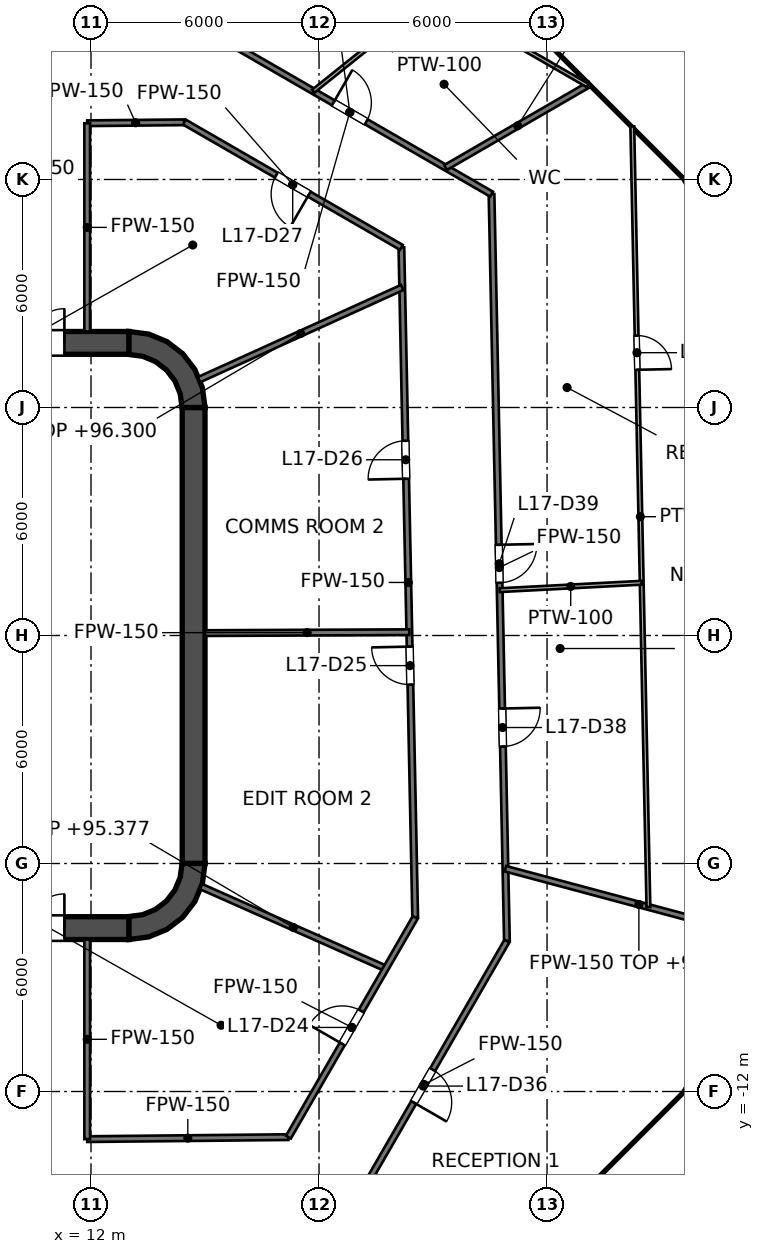
"""IFC4 building model, lengths in metres.
Left out: names, types, materials, properties, quantities, classifications, styles, units other than length and angle.
Written with IfcOpenShell. Run it as: python <this file> out.ifc"""

import sys

from ifc_helpers import new_model, si_unit, direction, frame, frame_2d, origin, place, context, subcontext, project, spatial, polyline, rectangle, outline, extrude, element, fill, save


model = new_model("IFC4")
c1 = context("Model", 3, precision=1e-05, world=origin(), true_north=direction((0.0, 1.0)))
c2 = subcontext(c1, "Body", "Model", "MODEL_VIEW")
j1 = project(units=[si_unit("LENGTHUNIT", "METRE"), si_unit("PLANEANGLEUNIT", "RADIAN")], contexts=[c1])
p1 = place(None, origin())
s1 = spatial("IfcSite", under=j1, at=p1, CompositionType="ELEMENT")
p2 = place(p1, origin())
s2 = spatial("IfcBuilding", under=s1, at=p2, CompositionType="ELEMENT")
p3 = place(p2, frame((0.0, 0.0, 92.4)))
s3 = spatial("IfcBuildingStorey", under=s2, at=p3, CompositionType="ELEMENT", Elevation=92.4)
p4 = place(p3, frame((-13.0, 7.7, 0.0), z_axis=(0.0, 0.0, 1.0), x_axis=(1.0, 0.0, 0.0)))
e1 = element("IfcWall", 1, at=p4, inside=s3, PredefinedType="SHEAR", context=c2, shape_type="SweptSolid", body=[
    extrude(rectangle(XDim=26.0, YDim=0.6, at=frame_2d((13.0, 0.0))), origin(), (0.0, 0.0, 1.0), 4.2),
])
p5 = place(p4, frame((1.7, 0.0, 0.0)))
e2 = element("IfcOpeningElement", 2, at=p5, cuts=e1, PredefinedType="OPENING", context=c2, shape_type="SweptSolid", body=[
    extrude(rectangle(XDim=1.8, YDim=2.1, at=frame_2d((0.9, 1.05))), frame((0.0, 0.3, 0.0), z_axis=(0.0, -1.0, 0.0), x_axis=(1.0, 0.0, 0.0)), (0.0, 0.0, 1.0), 0.6),
])
p6 = place(p4, frame((22.5, 0.0, 0.0)))
e3 = element("IfcOpeningElement", 3, at=p6, cuts=e1, PredefinedType="OPENING", context=c2, shape_type="SweptSolid", body=[
    extrude(rectangle(XDim=1.8, YDim=2.1, at=frame_2d((0.9, 1.05))), frame((0.0, 0.3, 0.0), z_axis=(0.0, -1.0, 0.0), x_axis=(1.0, 0.0, 0.0)), (0.0, 0.0, 1.0), 0.6),
])
p7 = place(p3, frame((-13.0, -7.7, 0.0), z_axis=(0.0, 0.0, 1.0), x_axis=(1.0, 0.0, 0.0)))
e4 = element("IfcWall", 4, at=p7, inside=s3, PredefinedType="SHEAR", context=c2, shape_type="SweptSolid", body=[
    extrude(rectangle(XDim=26.0, YDim=0.6, at=frame_2d((13.0, 0.0))), origin(), (0.0, 0.0, 1.0), 4.2),
])
p8 = place(p7, frame((1.7, 0.0, 0.0)))
e5 = element("IfcOpeningElement", 5, at=p8, cuts=e4, PredefinedType="OPENING", context=c2, shape_type="SweptSolid", body=[
    extrude(rectangle(XDim=1.8, YDim=2.1, at=frame_2d((0.9, 1.05))), frame((0.0, 0.3, 0.0), z_axis=(0.0, -1.0, 0.0), x_axis=(1.0, 0.0, 0.0)), (0.0, 0.0, 1.0), 0.6),
])
p9 = place(p7, frame((22.5, 0.0, 0.0)))
e6 = element("IfcOpeningElement", 6, at=p9, cuts=e4, PredefinedType="OPENING", context=c2, shape_type="SweptSolid", body=[
    extrude(rectangle(XDim=1.8, YDim=2.1, at=frame_2d((0.9, 1.05))), frame((0.0, 0.3, 0.0), z_axis=(0.0, -1.0, 0.0), x_axis=(1.0, 0.0, 0.0)), (0.0, 0.0, 1.0), 0.6),
])
p10 = place(p3, frame((14.7, -6.0, 0.0), z_axis=(0.0, 0.0, 1.0), x_axis=(0.0, 1.0, 0.0)))
e7 = element("IfcWall", 7, at=p10, inside=s3, PredefinedType="SHEAR", context=c2, shape_type="SweptSolid", body=[
    extrude(rectangle(XDim=12.0, YDim=0.6, at=frame_2d((6.0, 0.0))), origin(), (0.0, 0.0, 1.0), 4.2),
])
p11 = place(p3, origin())
e8 = element("IfcWall", 8, at=p11, inside=s3, PredefinedType="SHEAR", context=c2, shape_type="SweptSolid", body=[
    extrude(outline(polyline([(13.0, 8.0), (13.0, 7.395), (13.361, 7.347), (13.698, 7.208), (13.986, 6.986), (14.208, 6.698), (14.347, 6.361), (14.395, 6.0), (15.0, 6.0), (14.932, 6.518), (14.732, 7.0), (14.414, 7.414), (14.0, 7.732), (13.518, 7.932), (13.0, 8.0)])), origin(), (0.0, 0.0, 1.0), 4.2),
])
e9 = element("IfcWall", 9, at=p11, inside=s3, PredefinedType="SHEAR", context=c2, shape_type="SweptSolid", body=[
    extrude(outline(polyline([(15.0, -6.0), (14.395, -6.0), (14.347, -6.361), (14.208, -6.698), (13.986, -6.986), (13.698, -7.208), (13.361, -7.347), (13.0, -7.395), (13.0, -8.0), (13.518, -7.932), (14.0, -7.732), (14.414, -7.414), (14.732, -7.0), (14.932, -6.518), (15.0, -6.0)])), origin(), (0.0, 0.0, 1.0), 4.2),
])
p12 = place(p3, frame((11.8, -7.4, 0.0), z_axis=(0.0, 0.0, 1.0), x_axis=(0.0, 1.0, 0.0)))
e10 = element("IfcWall", 10, at=p12, inside=s3, PredefinedType="SOLIDWALL", context=c2, shape_type="SweptSolid", body=[
    extrude(rectangle(XDim=14.8, YDim=0.4, at=frame_2d((7.4, 0.0))), origin(), (0.0, 0.0, 1.0), 3.9),
])
p13 = place(p12, frame((11.2, 0.0, 0.0)))
e11 = element("IfcOpeningElement", 11, at=p13, cuts=e10, PredefinedType="OPENING", context=c2, shape_type="SweptSolid", body=[
    extrude(rectangle(XDim=1.1, YDim=2.1, at=frame_2d((0.55, 1.05))), frame((0.0, 0.2, 0.0), z_axis=(0.0, -1.0, 0.0), x_axis=(1.0, 0.0, 0.0)), (0.0, 0.0, 1.0), 0.4),
])
p14 = place(p12, frame((8.3, 0.0, 0.0)))
e12 = element("IfcOpeningElement", 12, at=p14, cuts=e10, PredefinedType="OPENING", context=c2, shape_type="SweptSolid", body=[
    extrude(rectangle(XDim=1.1, YDim=2.1, at=frame_2d((0.55, 1.05))), frame((0.0, 0.2, 0.0), z_axis=(0.0, -1.0, 0.0), x_axis=(1.0, 0.0, 0.0)), (0.0, 0.0, 1.0), 0.4),
])
p15 = place(p12, frame((5.4, 0.0, 0.0)))
e13 = element("IfcOpeningElement", 13, at=p15, cuts=e10, PredefinedType="OPENING", context=c2, shape_type="SweptSolid", body=[
    extrude(rectangle(XDim=1.1, YDim=2.1, at=frame_2d((0.55, 1.05))), frame((0.0, 0.2, 0.0), z_axis=(0.0, -1.0, 0.0), x_axis=(1.0, 0.0, 0.0)), (0.0, 0.0, 1.0), 0.4),
])
p16 = place(p12, frame((13.552, 0.0, 0.0)))
e14 = element("IfcOpeningElement", 14, at=p16, cuts=e10, PredefinedType="OPENING", context=c2, shape_type="SweptSolid", body=[
    extrude(rectangle(XDim=0.9, YDim=2.1, at=frame_2d((0.45, 1.05))), frame((0.0, 0.2, 0.0), z_axis=(0.0, -1.0, 0.0), x_axis=(1.0, 0.0, 0.0)), (0.0, 0.0, 1.0), 0.4),
])
p17 = place(p12, frame((0.347, 0.0, 0.0)))
e15 = element("IfcOpeningElement", 15, at=p17, cuts=e10, PredefinedType="OPENING", context=c2, shape_type="SweptSolid", body=[
    extrude(rectangle(XDim=0.9, YDim=2.1, at=frame_2d((0.45, 1.05))), frame((0.0, 0.2, 0.0), z_axis=(0.0, -1.0, 0.0), x_axis=(1.0, 0.0, 0.0)), (0.0, 0.0, 1.0), 0.4),
])
e16 = element("IfcWall", 16, at=p11, inside=s3, PredefinedType="SOLIDWALL", context=c2, shape_type="SweptSolid", body=[
    extrude(outline(polyline([(12.0, -5.675), (12.0, -5.925), (14.15, -5.925), (14.4, -5.925), (14.4, -5.675), (14.4, -3.025), (14.4, -2.775), (14.4, -0.125), (14.4, 0.125), (14.4, 2.775), (14.4, 3.025), (14.4, 5.675), (14.4, 5.925), (14.15, 5.925), (12.0, 5.925), (12.0, 5.675), (14.15, 5.675), (14.15, 3.025), (12.0, 3.025), (12.0, 2.775), (14.15, 2.775), (14.15, 0.125), (12.0, 0.125), (12.0, -0.125), (14.15, -0.125), (14.15, -2.775), (12.0, -2.775), (12.0, -3.025), (14.15, -3.025), (14.15, -5.675), (12.0, -5.675)])), origin(), (0.0, 0.0, 1.0), 3.9),
])
p18 = place(p3, frame((20.167, 10.213, 0.0), z_axis=(0.0, 0.0, 1.0), x_axis=(0.020610894613, -0.999787572949, 0.0)))
e17 = element("IfcWall", 17, at=p18, inside=s3, PredefinedType="PARTITIONING", context=c2, shape_type="SweptSolid", body=[
    extrude(rectangle(XDim=17.637, YDim=0.15, at=frame_2d((8.819, 0.0))), origin(), (0.0, 0.0, 1.0), 2.968),
])
p19 = place(p18, frame((10.508, 0.0, 0.0)))
e18 = element("IfcOpeningElement", 18, at=p19, cuts=e17, PredefinedType="OPENING", context=c2, shape_type="SweptSolid", body=[
    extrude(rectangle(XDim=1.0, YDim=2.1, at=frame_2d((0.5, 1.05))), frame((0.0, 0.075, 0.0), z_axis=(0.0, -1.0, 0.0), x_axis=(1.0, 0.0, 0.0)), (0.0, 0.0, 1.0), 0.15),
])
p20 = place(p18, frame((5.09, 0.0, 0.0)))
e19 = element("IfcOpeningElement", 19, at=p20, cuts=e17, PredefinedType="OPENING", context=c2, shape_type="SweptSolid", body=[
    extrude(rectangle(XDim=1.0, YDim=2.1, at=frame_2d((0.5, 1.05))), frame((0.0, 0.075, 0.0), z_axis=(0.0, -1.0, 0.0), x_axis=(1.0, 0.0, 0.0)), (0.0, 0.0, 1.0), 0.15),
])
p21 = place(p3, frame((22.539, 11.615, 0.0), z_axis=(0.0, 0.0, 1.0), x_axis=(0.020601506683, -0.99978776644, 0.0)))
e20 = element("IfcWall", 20, at=p21, inside=s3, PredefinedType="PARTITIONING", context=c2, shape_type="SweptSolid", body=[
    extrude(rectangle(XDim=19.66, YDim=0.15, at=frame_2d((9.83, 0.0))), origin(), (0.0, 0.0, 1.0), 2.968),
])
p22 = place(p21, frame((13.54, 0.0, 0.0)))
e21 = element("IfcOpeningElement", 21, at=p22, cuts=e20, PredefinedType="OPENING", context=c2, shape_type="SweptSolid", body=[
    extrude(rectangle(XDim=1.0, YDim=2.1, at=frame_2d((0.5, 1.05))), frame((0.0, 0.075, 0.0), z_axis=(0.0, -1.0, 0.0), x_axis=(1.0, 0.0, 0.0)), (0.0, 0.0, 1.0), 0.15),
])
p23 = place(p21, frame((9.23, 0.0, 0.0)))
e22 = element("IfcOpeningElement", 22, at=p23, cuts=e20, PredefinedType="OPENING", context=c2, shape_type="SweptSolid", body=[
    extrude(rectangle(XDim=1.0, YDim=2.1, at=frame_2d((0.5, 1.05))), frame((0.0, 0.075, 0.0), z_axis=(0.0, -1.0, 0.0), x_axis=(1.0, 0.0, 0.0)), (0.0, 0.0, 1.0), 0.15),
])
p24 = place(p3, frame((14.448, 13.515, 0.0), z_axis=(0.0, 0.0, 1.0), x_axis=(0.866032288321, -0.499988075443, 0.0)))
e23 = element("IfcWall", 23, at=p24, inside=s3, PredefinedType="PARTITIONING", context=c2, shape_type="SweptSolid", body=[
    extrude(rectangle(XDim=6.604, YDim=0.15, at=frame_2d((3.302, 0.0))), origin(), (0.0, 0.0, 1.0), 2.968),
])
p25 = place(p24, frame((2.802, 0.0, 0.0)))
e24 = element("IfcOpeningElement", 24, at=p25, cuts=e23, PredefinedType="OPENING", context=c2, shape_type="SweptSolid", body=[
    extrude(rectangle(XDim=1.0, YDim=2.1, at=frame_2d((0.5, 1.05))), frame((0.0, 0.075, 0.0), z_axis=(0.0, -1.0, 0.0), x_axis=(1.0, 0.0, 0.0)), (0.0, 0.0, 1.0), 0.15),
])
p26 = place(p3, frame((15.08, 15.921, 0.0), z_axis=(0.0, 0.0, 1.0), x_axis=(0.866020838546, -0.500007907142, 0.0)))
e25 = element("IfcWall", 25, at=p26, inside=s3, PredefinedType="PARTITIONING", context=c2, shape_type="SweptSolid", body=[
    extrude(rectangle(XDim=8.613, YDim=0.15, at=frame_2d((4.306, 0.0))), origin(), (0.0, 0.0, 1.0), 2.968),
])
p27 = place(p26, frame((3.807, 0.0, 0.0)))
e26 = element("IfcOpeningElement", 26, at=p27, cuts=e25, PredefinedType="OPENING", context=c2, shape_type="SweptSolid", body=[
    extrude(rectangle(XDim=1.0, YDim=2.1, at=frame_2d((0.5, 1.05))), frame((0.0, 0.075, 0.0), z_axis=(0.0, -1.0, 0.0), x_axis=(1.0, 0.0, 0.0)), (0.0, 0.0, 1.0), 0.15),
])
p28 = place(p3, frame((14.895, -6.607, 0.0), z_axis=(0.0, 0.0, 1.0), x_axis=(0.914233271379, -0.405188259337, 0.0)))
e27 = element("IfcWall", 27, at=p28, inside=s3, PredefinedType="PARTITIONING", context=c2, shape_type="SweptSolid", body=[
    extrude(rectangle(XDim=5.317, YDim=0.15, at=frame_2d((2.659, 0.0))), origin(), (0.0, 0.0, 1.0), 2.977),
])
p29 = place(p3, frame((22.905, -6.137, 0.0), z_axis=(0.0, 0.0, 1.0), x_axis=(0.965915974273, -0.258855810529, 0.0)))
e28 = element("IfcWall", 28, at=p29, inside=s3, PredefinedType="PARTITIONING", context=c2, shape_type="SweptSolid", body=[
    extrude(rectangle(XDim=7.271, YDim=0.15, at=frame_2d((3.635, 0.0))), origin(), (0.0, 0.0, 1.0), 3.727),
])
p30 = place(p3, frame((15.0, 0.063, 0.0), z_axis=(0.0, 0.0, 1.0), x_axis=(0.999990294223, 0.004405843865, 0.0)))
e29 = element("IfcWall", 29, at=p30, inside=s3, PredefinedType="PARTITIONING", context=c2, shape_type="SweptSolid", body=[
    extrude(rectangle(XDim=5.375, YDim=0.15, at=frame_2d((2.688, 0.0))), origin(), (0.0, 0.0, 1.0), 2.968),
])
p31 = place(p3, frame((11.9, -13.253, 0.0), z_axis=(0.0, 0.0, 1.0), x_axis=(0.999950853109, 0.009914200296, 0.0)))
e30 = element("IfcWall", 30, at=p31, inside=s3, PredefinedType="PARTITIONING", context=c2, shape_type="SweptSolid", body=[
    extrude(rectangle(XDim=5.294, YDim=0.15, at=frame_2d((2.647, 0.0))), origin(), (0.0, 0.0, 1.0), 2.968),
])
p32 = place(p3, frame((11.9, 13.48, 0.0), z_axis=(0.0, 0.0, 1.0), x_axis=(0.999950357576, 0.009964054536, 0.0)))
e31 = element("IfcWall", 31, at=p32, inside=s3, PredefinedType="PARTITIONING", context=c2, shape_type="SweptSolid", body=[
    extrude(rectangle(XDim=2.548, YDim=0.15, at=frame_2d((1.274, 0.0))), origin(), (0.0, 0.0, 1.0), 2.968),
])
p33 = place(p3, frame((14.843, 6.733, 0.0), z_axis=(0.0, 0.0, 1.0), x_axis=(0.910628361306, 0.413226315214, 0.0)))
e32 = element("IfcWall", 32, at=p33, inside=s3, PredefinedType="PARTITIONING", context=c2, shape_type="SweptSolid", body=[
    extrude(rectangle(XDim=5.87, YDim=0.15, at=frame_2d((2.935, 0.0))), origin(), (0.0, 0.0, 1.0), 3.9),
])
p34 = place(p3, frame((21.329, 12.314, 0.0), z_axis=(0.0, 0.0, 1.0), x_axis=(0.865416132284, 0.501053807472, 0.0)))
e33 = element("IfcWall", 33, at=p34, inside=s3, PredefinedType="PARTITIONING", context=c2, shape_type="SweptSolid", body=[
    extrude(rectangle(XDim=4.39, YDim=0.15, at=frame_2d((2.195, 0.0))), origin(), (0.0, 0.0, 1.0), 3.045),
])
p35 = place(p3, frame((18.587, -15.587, 0.0), z_axis=(0.0, 0.0, 1.0), x_axis=(0.500026433136, 0.866010142069, 0.0)))
e34 = element("IfcWall", 34, at=p35, inside=s3, PredefinedType="PARTITIONING", context=c2, shape_type="SweptSolid", body=[
    extrude(rectangle(XDim=8.713, YDim=0.15, at=frame_2d((4.357, 0.0))), origin(), (0.0, 0.0, 1.0), 2.968),
])
p36 = place(p35, frame((3.807, 0.0, 0.0)))
e35 = element("IfcOpeningElement", 35, at=p36, cuts=e34, PredefinedType="OPENING", context=c2, shape_type="SweptSolid", body=[
    extrude(rectangle(XDim=1.0, YDim=2.1, at=frame_2d((0.5, 1.05))), frame((0.0, 0.075, 0.0), z_axis=(0.0, -1.0, 0.0), x_axis=(1.0, 0.0, 0.0)), (0.0, 0.0, 1.0), 0.15),
])
p37 = place(p3, frame((17.194, -13.201, 0.0), z_axis=(0.0, 0.0, 1.0), x_axis=(0.50001062018, 0.866019272134, 0.0)))
e36 = element("IfcWall", 36, at=p37, inside=s3, PredefinedType="PARTITIONING", context=c2, shape_type="SweptSolid", body=[
    extrude(rectangle(XDim=6.674, YDim=0.15, at=frame_2d((3.337, 0.0))), origin(), (0.0, 0.0, 1.0), 2.968),
])
p38 = place(p37, frame((2.833, 0.0, 0.0)))
e37 = element("IfcOpeningElement", 37, at=p38, cuts=e36, PredefinedType="OPENING", context=c2, shape_type="SweptSolid", body=[
    extrude(rectangle(XDim=1.0, YDim=2.1, at=frame_2d((0.5, 1.05))), frame((0.0, 0.075, 0.0), z_axis=(0.0, -1.0, 0.0), x_axis=(1.0, 0.0, 0.0)), (0.0, 0.0, 1.0), 0.15),
])
p39 = place(p3, frame((11.9, -13.253, 0.0), z_axis=(0.0, 0.0, 1.0), x_axis=(0.0, 1.0, 0.0)))
e38 = element("IfcWall", 38, at=p39, inside=s3, PredefinedType="PARTITIONING", context=c2, shape_type="SweptSolid", body=[
    extrude(rectangle(XDim=5.253, YDim=0.15, at=frame_2d((2.626, 0.0))), origin(), (0.0, 0.0, 1.0), 2.968),
])
p40 = place(p3, frame((11.9, 8.0, 0.0), z_axis=(0.0, 0.0, 1.0), x_axis=(0.0, 1.0, 0.0)))
e39 = element("IfcWall", 39, at=p40, inside=s3, PredefinedType="PARTITIONING", context=c2, shape_type="SweptSolid", body=[
    extrude(rectangle(XDim=5.479, YDim=0.15, at=frame_2d((2.74, 0.0))), origin(), (0.0, 0.0, 1.0), 2.968),
])
p41 = place(p3, frame((26.243, 13.397, 0.0), z_axis=(0.0, 0.0, 1.0), x_axis=(0.020639766813, -0.999786977324, 0.0)))
e40 = element("IfcWall", 40, at=p41, inside=s3, PredefinedType="PARTITIONING", context=c2, shape_type="SweptSolid", body=[
    extrude(rectangle(XDim=20.546, YDim=0.1, at=frame_2d((10.273, 0.0))), origin(), (0.0, 0.0, 1.0), 2.968),
])
p42 = place(p41, frame((5.506, 0.0, 0.0)))
e41 = element("IfcOpeningElement", 41, at=p42, cuts=e40, PredefinedType="OPENING", context=c2, shape_type="SweptSolid", body=[
    extrude(rectangle(XDim=0.9, YDim=2.1, at=frame_2d((0.45, 1.05))), frame((0.0, 0.05, 0.0), z_axis=(0.0, -1.0, 0.0), x_axis=(1.0, 0.0, 0.0)), (0.0, 0.0, 1.0), 0.1),
])
p43 = place(p3, frame((16.065, 19.671, 0.0), z_axis=(0.0, 0.0, 1.0), x_axis=(0.866058502288, -0.499942667328, 0.0)))
e42 = element("IfcWall", 42, at=p43, inside=s3, PredefinedType="PARTITIONING", context=c2, shape_type="SweptSolid", body=[
    extrude(rectangle(XDim=10.397, YDim=0.1, at=frame_2d((5.198, 0.0))), origin(), (0.0, 0.0, 1.0), 2.968),
])
p44 = place(p3, frame((22.754, 1.193, 0.0), z_axis=(0.0, 0.0, 1.0), x_axis=(0.998643838338, 0.05206231025, 0.0)))
e43 = element("IfcWall", 43, at=p44, inside=s3, PredefinedType="PARTITIONING", context=c2, shape_type="SweptSolid", body=[
    extrude(rectangle(XDim=3.742, YDim=0.1, at=frame_2d((1.871, 0.0))), origin(), (0.0, 0.0, 1.0), 3.9),
])
p45 = place(p3, frame((17.849, 14.323, 0.0), z_axis=(0.0, 0.0, 1.0), x_axis=(0.7800073623, 0.625770337071, 0.0)))
e44 = element("IfcWall", 44, at=p45, inside=s3, PredefinedType="PARTITIONING", context=c2, shape_type="SweptSolid", body=[
    extrude(rectangle(XDim=4.013, YDim=0.1, at=frame_2d((2.006, 0.0))), origin(), (0.0, 0.0, 1.0), 3.9),
])
p46 = place(p13, origin())
e45 = element("IfcDoor", 45, at=p46, inside=s3, OperationType="DOUBLE_DOOR_SLIDING", PredefinedType="DOOR", context=c2, shape_type="SweptSolid", body=[
    extrude(rectangle(XDim=1.1, YDim=2.1, at=frame_2d((0.55, 1.05))), frame((0.0, 0.025, 0.0), z_axis=(0.0, -1.0, 0.0), x_axis=(1.0, 0.0, 0.0)), (0.0, 0.0, 1.0), 0.05),
])
fill(e11, e45)
p47 = place(p14, origin())
e46 = element("IfcDoor", 46, at=p47, inside=s3, OperationType="DOUBLE_DOOR_SLIDING", PredefinedType="DOOR", context=c2, shape_type="SweptSolid", body=[
    extrude(rectangle(XDim=1.1, YDim=2.1, at=frame_2d((0.55, 1.05))), frame((0.0, 0.025, 0.0), z_axis=(0.0, -1.0, 0.0), x_axis=(1.0, 0.0, 0.0)), (0.0, 0.0, 1.0), 0.05),
])
fill(e12, e46)
p48 = place(p15, origin())
e47 = element("IfcDoor", 47, at=p48, inside=s3, OperationType="DOUBLE_DOOR_SLIDING", PredefinedType="DOOR", context=c2, shape_type="SweptSolid", body=[
    extrude(rectangle(XDim=1.1, YDim=2.1, at=frame_2d((0.55, 1.05))), frame((0.0, 0.025, 0.0), z_axis=(0.0, -1.0, 0.0), x_axis=(1.0, 0.0, 0.0)), (0.0, 0.0, 1.0), 0.05),
])
fill(e13, e47)
p49 = place(p16, origin())
e48 = element("IfcDoor", 48, at=p49, inside=s3, OperationType="SINGLE_SWING_RIGHT", PredefinedType="DOOR", context=c2, shape_type="SweptSolid", body=[
    extrude(rectangle(XDim=0.9, YDim=2.1, at=frame_2d((0.45, 1.05))), frame((0.0, 0.025, 0.0), z_axis=(0.0, -1.0, 0.0), x_axis=(1.0, 0.0, 0.0)), (0.0, 0.0, 1.0), 0.05),
])
fill(e14, e48)
p50 = place(p17, origin())
e49 = element("IfcDoor", 49, at=p50, inside=s3, OperationType="SINGLE_SWING_RIGHT", PredefinedType="DOOR", context=c2, shape_type="SweptSolid", body=[
    extrude(rectangle(XDim=0.9, YDim=2.1, at=frame_2d((0.45, 1.05))), frame((0.0, 0.025, 0.0), z_axis=(0.0, -1.0, 0.0), x_axis=(1.0, 0.0, 0.0)), (0.0, 0.0, 1.0), 0.05),
])
fill(e15, e49)
p51 = place(p6, origin())
e50 = element("IfcDoor", 50, at=p51, inside=s3, OperationType="DOUBLE_DOOR_SINGLE_SWING", PredefinedType="DOOR", context=c2, shape_type="SweptSolid", body=[
    extrude(rectangle(XDim=1.8, YDim=2.1, at=frame_2d((0.9, 1.05))), frame((0.0, 0.025, 0.0), z_axis=(0.0, -1.0, 0.0), x_axis=(1.0, 0.0, 0.0)), (0.0, 0.0, 1.0), 0.05),
])
fill(e3, e50)
p52 = place(p9, origin())
e51 = element("IfcDoor", 51, at=p52, inside=s3, OperationType="DOUBLE_DOOR_SINGLE_SWING", PredefinedType="DOOR", context=c2, shape_type="SweptSolid", body=[
    extrude(rectangle(XDim=1.8, YDim=2.1, at=frame_2d((0.9, 1.05))), frame((0.0, 0.025, 0.0), z_axis=(0.0, -1.0, 0.0), x_axis=(1.0, 0.0, 0.0)), (0.0, 0.0, 1.0), 0.05),
])
fill(e6, e51)
p53 = place(p38, origin())
e52 = element("IfcDoor", 52, at=p53, inside=s3, OperationType="SINGLE_SWING_LEFT", PredefinedType="DOOR", context=c2, shape_type="SweptSolid", body=[
    extrude(rectangle(XDim=1.0, YDim=2.1, at=frame_2d((0.5, 1.05))), frame((0.0, 0.025, 0.0), z_axis=(0.0, -1.0, 0.0), x_axis=(1.0, 0.0, 0.0)), (0.0, 0.0, 1.0), 0.05),
])
fill(e37, e52)
p54 = place(p19, origin())
e53 = element("IfcDoor", 53, at=p54, inside=s3, OperationType="SINGLE_SWING_LEFT", PredefinedType="DOOR", context=c2, shape_type="SweptSolid", body=[
    extrude(rectangle(XDim=1.0, YDim=2.1, at=frame_2d((0.5, 1.05))), frame((0.0, 0.025, 0.0), z_axis=(0.0, -1.0, 0.0), x_axis=(1.0, 0.0, 0.0)), (0.0, 0.0, 1.0), 0.05),
])
fill(e18, e53)
p55 = place(p20, origin())
e54 = element("IfcDoor", 54, at=p55, inside=s3, OperationType="SINGLE_SWING_RIGHT", PredefinedType="DOOR", context=c2, shape_type="SweptSolid", body=[
    extrude(rectangle(XDim=1.0, YDim=2.1, at=frame_2d((0.5, 1.05))), frame((0.0, 0.025, 0.0), z_axis=(0.0, -1.0, 0.0), x_axis=(1.0, 0.0, 0.0)), (0.0, 0.0, 1.0), 0.05),
])
fill(e19, e54)
p56 = place(p25, origin())
e55 = element("IfcDoor", 55, at=p56, inside=s3, OperationType="SINGLE_SWING_RIGHT", PredefinedType="DOOR", context=c2, shape_type="SweptSolid", body=[
    extrude(rectangle(XDim=1.0, YDim=2.1, at=frame_2d((0.5, 1.05))), frame((0.0, 0.025, 0.0), z_axis=(0.0, -1.0, 0.0), x_axis=(1.0, 0.0, 0.0)), (0.0, 0.0, 1.0), 0.05),
])
fill(e24, e55)
p57 = place(p36, origin())
e56 = element("IfcDoor", 56, at=p57, inside=s3, OperationType="SINGLE_SWING_LEFT", PredefinedType="DOOR", context=c2, shape_type="SweptSolid", body=[
    extrude(rectangle(XDim=1.0, YDim=2.1, at=frame_2d((0.5, 1.05))), frame((0.0, 0.025, 0.0), z_axis=(0.0, -1.0, 0.0), x_axis=(1.0, 0.0, 0.0)), (0.0, 0.0, 1.0), 0.05),
])
fill(e35, e56)
p58 = place(p22, origin())
e57 = element("IfcDoor", 57, at=p58, inside=s3, OperationType="SINGLE_SWING_LEFT", PredefinedType="DOOR", context=c2, shape_type="SweptSolid", body=[
    extrude(rectangle(XDim=1.0, YDim=2.1, at=frame_2d((0.5, 1.05))), frame((0.0, 0.025, 0.0), z_axis=(0.0, -1.0, 0.0), x_axis=(1.0, 0.0, 0.0)), (0.0, 0.0, 1.0), 0.05),
])
fill(e21, e57)
p59 = place(p23, origin())
e58 = element("IfcDoor", 58, at=p59, inside=s3, OperationType="SINGLE_SWING_LEFT", PredefinedType="DOOR", context=c2, shape_type="SweptSolid", body=[
    extrude(rectangle(XDim=1.0, YDim=2.1, at=frame_2d((0.5, 1.05))), frame((0.0, 0.025, 0.0), z_axis=(0.0, -1.0, 0.0), x_axis=(1.0, 0.0, 0.0)), (0.0, 0.0, 1.0), 0.05),
])
fill(e22, e58)
p60 = place(p42, origin())
e59 = element("IfcDoor", 59, at=p60, inside=s3, OperationType="SINGLE_SWING_RIGHT", PredefinedType="DOOR", context=c2, shape_type="SweptSolid", body=[
    extrude(rectangle(XDim=0.9, YDim=2.1, at=frame_2d((0.45, 1.05))), frame((0.0, 0.025, 0.0), z_axis=(0.0, -1.0, 0.0), x_axis=(1.0, 0.0, 0.0)), (0.0, 0.0, 1.0), 0.05),
])
fill(e41, e59)
p61 = place(p27, origin())
e60 = element("IfcDoor", 60, at=p61, inside=s3, OperationType="SINGLE_SWING_LEFT", PredefinedType="DOOR", context=c2, shape_type="SweptSolid", body=[
    extrude(rectangle(XDim=1.0, YDim=2.1, at=frame_2d((0.5, 1.05))), frame((0.0, 0.025, 0.0), z_axis=(0.0, -1.0, 0.0), x_axis=(1.0, 0.0, 0.0)), (0.0, 0.0, 1.0), 0.05),
])
fill(e26, e60)
save(model, sys.argv[1])
